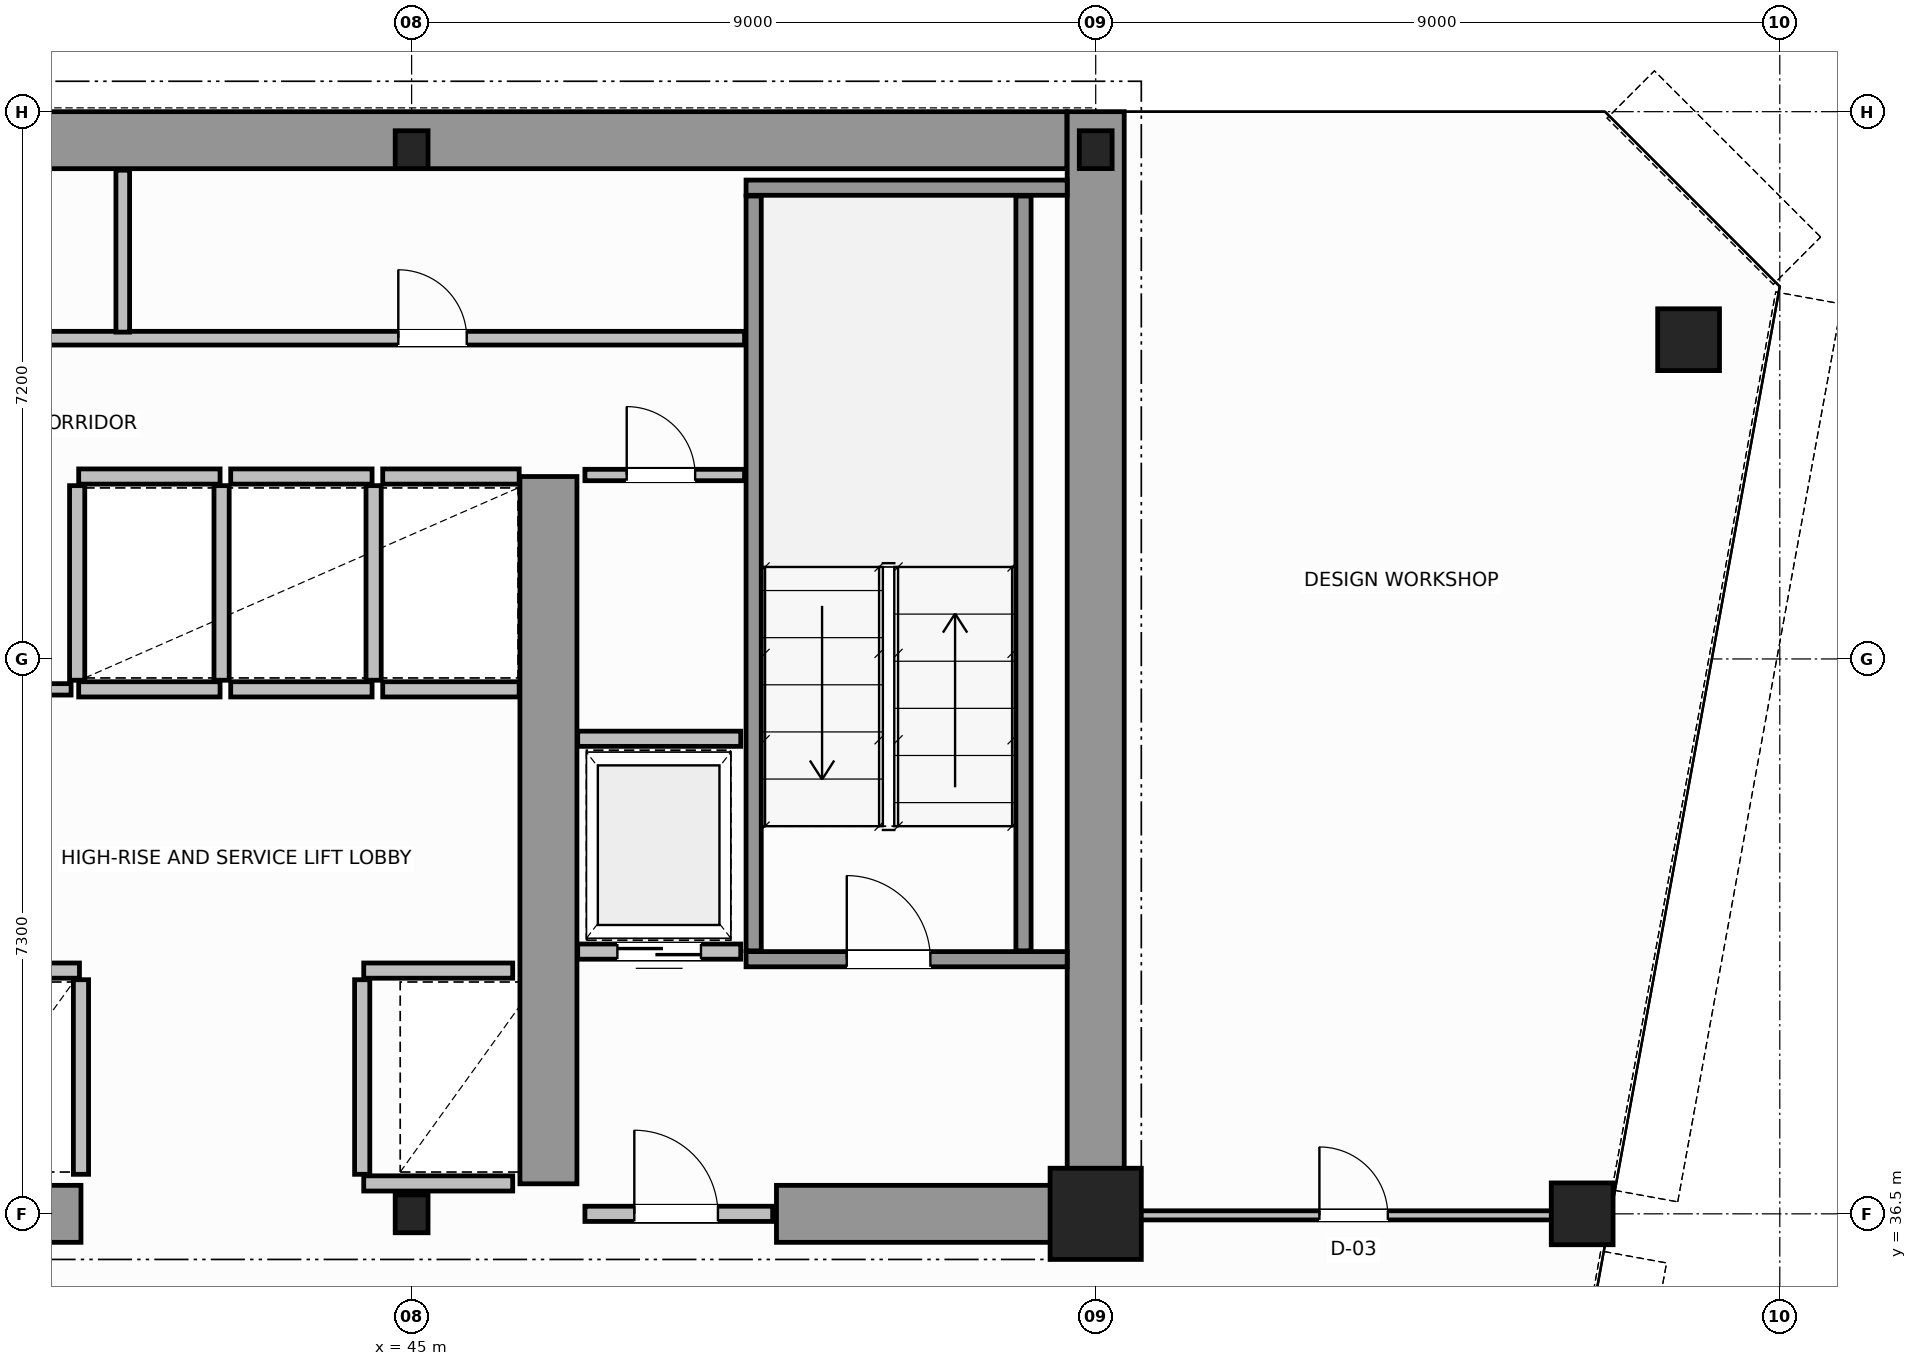
"""IFC4 building model, lengths in metres.
Left out: names, types, materials, properties, quantities, classifications, styles, units other than length and angle.
Written with IfcOpenShell. Run it as: python <this file> out.ifc"""

import sys

from ifc_helpers import new_model, si_unit, direction, frame, frame_2d, origin, origin_2d, place, context, subcontext, project, spatial, rectangle, hollow_circle, i_section, extrude, source, transform, mapped, element, fill, save


model = new_model("IFC4")
c1 = context("Model", 3, precision=1e-05, world=origin(), true_north=direction((0.0, 1.0)))
c2 = subcontext(c1, "Body", "Model", "MODEL_VIEW")
j1 = project(units=[si_unit("LENGTHUNIT", "METRE"), si_unit("PLANEANGLEUNIT", "RADIAN")], contexts=[c1])
p1 = place(None, origin())
s1 = spatial("IfcSite", under=j1, at=p1, CompositionType="ELEMENT")
p2 = place(p1, origin())
s2 = spatial("IfcBuilding", under=s1, at=p2, CompositionType="ELEMENT")
p3 = place(p2, frame((0.0, 0.0, 161.4)))
s3 = spatial("IfcBuildingStorey", under=s2, at=p3, CompositionType="ELEMENT", Elevation=161.4)
m1 = source(origin(), c2, "Body", "SweptSolid", [
    extrude(i_section(OverallWidth=0.432, OverallDepth=0.498, WebThickness=0.055, FlangeThickness=0.068, FilletRadius=0.015, at=origin_2d()), origin(), (0.0, 0.0, 1.0), 3.8),
])
p4 = place(p3, frame((45.0, 36.5, 0.0), z_axis=(0.0, 0.0, 1.0), x_axis=(1.0, 0.0, 0.0)))
e1 = element("IfcColumn", 1, at=p4, inside=s3, PredefinedType="COLUMN", context=c2, shape_type="MappedRepresentation", body=[
    mapped(m1, transform((0.0, 0.0, 0.0), scale=1.0)),
])
m2 = source(origin(), c2, "Body", "SweptSolid", [
    extrude(rectangle(XDim=1.2, YDim=1.2, at=origin_2d()), origin(), (0.0, 0.0, 1.0), 3.8),
])
p5 = place(p3, frame((54.0, 36.5, 0.0), z_axis=(0.0, 0.0, 1.0), x_axis=(1.0, 0.0, 0.0)))
e2 = element("IfcColumn", 2, at=p5, inside=s3, PredefinedType="COLUMN", context=c2, shape_type="MappedRepresentation", body=[
    mapped(m2, transform((0.0, 0.0, 0.0), scale=1.0)),
])
for number, where, z_axis, x_axis in (
    (3, (45.0, 50.5, 0.0), (0.0, 0.0, 1.0), (1.0, 0.0, 0.0)),
    (4, (54.0, 50.5, 0.0), (0.0, 0.0, 1.0), (1.0, 0.0, 0.0)),
):
    element("IfcColumn", number, at=place(p3, frame(where, z_axis=z_axis, x_axis=x_axis)), inside=s3, PredefinedType="COLUMN", context=c2, shape_type="MappedRepresentation", body=[
        mapped(m1, transform((0.0, 0.0, 0.0), scale=1.0)),
    ])
m3 = source(origin(), c2, "Body", "SweptSolid", [
    extrude(hollow_circle(Radius=0.406, WallThickness=0.04, at=origin_2d()), origin(), (0.0, 0.0, 1.0), 3.8),
])
for number, where, z_axis, x_axis in (
    (5, (61.8, 48.0, 0.0), (0.0, 0.0, 1.0), (1.0, 0.0, 0.0)),
    (6, (60.4, 36.5, 0.0), (0.0, 0.0, 1.0), (1.0, 0.0, 0.0)),
):
    element("IfcColumn", number, at=place(p3, frame(where, z_axis=z_axis, x_axis=x_axis)), inside=s3, PredefinedType="COLUMN", context=c2, shape_type="MappedRepresentation", body=[
        mapped(m3, transform((0.0, 0.0, 0.0), scale=1.0)),
    ])
p6 = place(p3, frame((34.002, 50.625, 0.0), z_axis=(0.0, 0.0, 1.0), x_axis=(1.0, 0.0, 0.0)))
e7 = element("IfcWall", 7, at=p6, inside=s3, PredefinedType="SHEAR", context=c2, shape_type="SweptSolid", body=[
    extrude(rectangle(XDim=19.619, YDim=0.75, at=frame_2d((9.81, 0.0))), origin(), (0.0, 0.0, 1.0), 3.8),
])
p7 = place(p3, frame((54.0, 36.5, 0.0), z_axis=(0.0, 0.0, 1.0), x_axis=(0.0, 1.0, 0.0)))
e8 = element("IfcWall", 8, at=p7, inside=s3, PredefinedType="SHEAR", context=c2, shape_type="SweptSolid", body=[
    extrude(rectangle(XDim=14.5, YDim=0.75, at=frame_2d((7.25, 0.0))), origin(), (0.0, 0.0, 1.0), 3.8),
])
p8 = place(p3, frame((36.15, 36.5, 0.0), z_axis=(0.0, 0.0, 1.0), x_axis=(1.0, 0.0, 0.0)))
e9 = element("IfcWall", 9, at=p8, inside=s3, PredefinedType="SHEAR", context=c2, shape_type="SweptSolid", body=[
    extrude(rectangle(XDim=4.5, YDim=0.75, at=frame_2d((2.25, 0.0))), origin(), (0.0, 0.0, 1.0), 3.8),
])
p9 = place(p3, frame((49.8, 36.5, 0.0), z_axis=(0.0, 0.0, 1.0), x_axis=(1.0, 0.0, 0.0)))
e10 = element("IfcWall", 10, at=p9, inside=s3, PredefinedType="SHEAR", context=c2, shape_type="SweptSolid", body=[
    extrude(rectangle(XDim=3.805, YDim=0.75, at=frame_2d((1.902, 0.0))), origin(), (0.0, 0.0, 1.0), 2.38),
])
p10 = place(p3, frame((46.8, 36.895, 0.0), z_axis=(0.0, 0.0, 1.0), x_axis=(0.0, 1.0, 0.0)))
e11 = element("IfcWall", 11, at=p10, inside=s3, PredefinedType="SHEAR", context=c2, shape_type="SweptSolid", body=[
    extrude(rectangle(XDim=9.305, YDim=0.75, at=frame_2d((4.652, 0.0))), origin(), (0.0, 0.0, 1.0), 3.8),
])
p11 = place(p3, frame((49.4, 39.85, 0.0), z_axis=(0.0, 0.0, 1.0), x_axis=(1.0, 0.0, 0.0)))
e12 = element("IfcWall", 12, at=p11, inside=s3, PredefinedType="SOLIDWALL", context=c2, shape_type="SweptSolid", body=[
    extrude(rectangle(XDim=4.225, YDim=0.2, at=frame_2d((2.113, 0.0))), origin(), (0.0, 0.0, 1.0), 3.8),
])
p12 = place(p11, frame((1.325, 0.0, 0.0)))
e13 = element("IfcOpeningElement", 13, at=p12, cuts=e12, PredefinedType="OPENING", context=c2, shape_type="SweptSolid", body=[
    extrude(rectangle(XDim=1.1, YDim=2.15, at=frame_2d((0.55, 1.075))), frame((0.0, 0.11, 0.0), z_axis=(0.0, -1.0, 0.0), x_axis=(1.0, 0.0, 0.0)), (0.0, 0.0, 1.0), 0.22),
])
p13 = place(p3, frame((49.4, 50.0, 0.0), z_axis=(0.0, 0.0, 1.0), x_axis=(1.0, 0.0, 0.0)))
e14 = element("IfcWall", 14, at=p13, inside=s3, PredefinedType="SOLIDWALL", context=c2, shape_type="SweptSolid", body=[
    extrude(rectangle(XDim=4.225, YDim=0.2, at=frame_2d((2.113, 0.0))), origin(), (0.0, 0.0, 1.0), 3.8),
])
for number, where, z_axis, x_axis in (
    (15, (49.5, 39.96, 0.0), (0.0, 0.0, 1.0), (0.0, 1.0, 0.0)),
    (16, (53.05, 39.96, 0.0), (0.0, 0.0, 1.0), (0.0, 1.0, 0.0)),
):
    element("IfcWall", number, at=place(p3, frame(where, z_axis=z_axis, x_axis=x_axis)), inside=s3, PredefinedType="SOLIDWALL", context=c2, shape_type="SweptSolid", body=[
        extrude(rectangle(XDim=9.93, YDim=0.2, at=frame_2d((4.965, 0.0))), origin(), (0.0, 0.0, 1.0), 3.8),
    ])
p14 = place(p3, frame((47.28, 36.5, 0.0), z_axis=(0.0, 0.0, 1.0), x_axis=(1.0, 0.0, 0.0)))
e17 = element("IfcWall", 17, at=p14, inside=s3, PredefinedType="SOLIDWALL", context=c2, shape_type="SweptSolid", body=[
    extrude(rectangle(XDim=2.47, YDim=0.2, at=frame_2d((1.235, 0.0))), origin(), (0.0, 0.0, 1.0), 2.37),
])
p15 = place(p14, frame((0.65, 0.0, 0.0)))
e18 = element("IfcOpeningElement", 18, at=p15, cuts=e17, PredefinedType="OPENING", context=c2, shape_type="SweptSolid", body=[
    extrude(rectangle(XDim=1.1, YDim=2.15, at=frame_2d((0.55, 1.075))), frame((0.0, 0.11, 0.0), z_axis=(0.0, -1.0, 0.0), x_axis=(1.0, 0.0, 0.0)), (0.0, 0.0, 1.0), 0.22),
])
p16 = place(p3, frame((38.785, 39.7, 0.0), z_axis=(0.0, 0.0, 1.0), x_axis=(1.0, 0.0, 0.0)))
e19 = element("IfcWall", 19, at=p16, inside=s3, PredefinedType="SOLIDWALL", context=c2, shape_type="SweptSolid", body=[
    extrude(rectangle(XDim=1.845, YDim=0.2, at=frame_2d((0.922, 0.0))), origin(), (0.0, 0.0, 1.0), 3.58),
])
p17 = place(p3, frame((40.65, 37.02, 0.0), z_axis=(0.0, 0.0, 1.0), x_axis=(0.0, 1.0, 0.0)))
e20 = element("IfcWall", 20, at=p17, inside=s3, PredefinedType="SOLIDWALL", context=c2, shape_type="SweptSolid", body=[
    extrude(rectangle(XDim=2.56, YDim=0.2, at=frame_2d((1.28, 0.0))), origin(), (0.0, 0.0, 1.0), 3.58),
])
p18 = place(p3, frame((44.37, 39.7, 0.0), z_axis=(0.0, 0.0, 1.0), x_axis=(1.0, 0.0, 0.0)))
e21 = element("IfcWall", 21, at=p18, inside=s3, PredefinedType="SOLIDWALL", context=c2, shape_type="SweptSolid", body=[
    extrude(rectangle(XDim=1.96, YDim=0.2, at=frame_2d((0.98, 0.0))), origin(), (0.0, 0.0, 1.0), 3.58),
])
p19 = place(p3, frame((44.37, 36.9, 0.0), z_axis=(0.0, 0.0, 1.0), x_axis=(1.0, 0.0, 0.0)))
e22 = element("IfcWall", 22, at=p19, inside=s3, PredefinedType="SOLIDWALL", context=c2, shape_type="SweptSolid", body=[
    extrude(rectangle(XDim=1.96, YDim=0.2, at=frame_2d((0.98, 0.0))), origin(), (0.0, 0.0, 1.0), 2.37),
])
p20 = place(p3, frame((44.35, 37.02, 0.0), z_axis=(0.0, 0.0, 1.0), x_axis=(0.0, 1.0, 0.0)))
e23 = element("IfcWall", 23, at=p20, inside=s3, PredefinedType="SOLIDWALL", context=c2, shape_type="SweptSolid", body=[
    extrude(rectangle(XDim=2.56, YDim=0.2, at=frame_2d((1.28, 0.0))), origin(), (0.0, 0.0, 1.0), 3.58),
])
for number, where, z_axis, x_axis in (
    (24, (40.62, 43.4, 0.0), (0.0, 0.0, 1.0), (1.0, 0.0, 0.0)),
    (25, (40.62, 46.2, 0.0), (0.0, 0.0, 1.0), (1.0, 0.0, 0.0)),
):
    element("IfcWall", number, at=place(p3, frame(where, z_axis=z_axis, x_axis=x_axis)), inside=s3, PredefinedType="SOLIDWALL", context=c2, shape_type="SweptSolid", body=[
        extrude(rectangle(XDim=1.86, YDim=0.2, at=frame_2d((0.93, 0.0))), origin(), (0.0, 0.0, 1.0), 3.58),
    ])
for number, where, z_axis, x_axis in (
    (26, (40.6, 43.52, 0.0), (0.0, 0.0, 1.0), (0.0, 1.0, 0.0)),
    (27, (42.5, 43.52, 0.0), (0.0, 0.0, 1.0), (0.0, 1.0, 0.0)),
):
    element("IfcWall", number, at=place(p3, frame(where, z_axis=z_axis, x_axis=x_axis)), inside=s3, PredefinedType="SOLIDWALL", context=c2, shape_type="SweptSolid", body=[
        extrude(rectangle(XDim=2.56, YDim=0.2, at=frame_2d((1.28, 0.0))), origin(), (0.0, 0.0, 1.0), 3.58),
    ])
for number, where, z_axis, x_axis in (
    (28, (42.62, 43.4, 0.0), (0.0, 0.0, 1.0), (1.0, 0.0, 0.0)),
    (29, (42.62, 46.2, 0.0), (0.0, 0.0, 1.0), (1.0, 0.0, 0.0)),
):
    element("IfcWall", number, at=place(p3, frame(where, z_axis=z_axis, x_axis=x_axis)), inside=s3, PredefinedType="SOLIDWALL", context=c2, shape_type="SweptSolid", body=[
        extrude(rectangle(XDim=1.86, YDim=0.2, at=frame_2d((0.93, 0.0))), origin(), (0.0, 0.0, 1.0), 3.58),
    ])
p21 = place(p3, frame((44.5, 43.52, 0.0), z_axis=(0.0, 0.0, 1.0), x_axis=(0.0, 1.0, 0.0)))
e30 = element("IfcWall", 30, at=p21, inside=s3, PredefinedType="SOLIDWALL", context=c2, shape_type="SweptSolid", body=[
    extrude(rectangle(XDim=2.56, YDim=0.2, at=frame_2d((1.28, 0.0))), origin(), (0.0, 0.0, 1.0), 3.58),
])
for number, where, z_axis, x_axis in (
    (31, (44.62, 43.4, 0.0), (0.0, 0.0, 1.0), (1.0, 0.0, 0.0)),
    (32, (44.62, 46.2, 0.0), (0.0, 0.0, 1.0), (1.0, 0.0, 0.0)),
):
    element("IfcWall", number, at=place(p3, frame(where, z_axis=z_axis, x_axis=x_axis)), inside=s3, PredefinedType="SOLIDWALL", context=c2, shape_type="SweptSolid", body=[
        extrude(rectangle(XDim=1.795, YDim=0.2, at=frame_2d((0.897, 0.0))), origin(), (0.0, 0.0, 1.0), 3.58),
    ])
p22 = place(p3, frame((47.185, 39.95, 0.0), z_axis=(0.0, 0.0, 1.0), x_axis=(1.0, 0.0, 0.0)))
e33 = element("IfcWall", 33, at=p22, inside=s3, PredefinedType="SOLIDWALL", context=c2, shape_type="SweptSolid", body=[
    extrude(rectangle(XDim=2.145, YDim=0.2, at=frame_2d((1.073, 0.0))), origin(), (0.0, 0.0, 1.0), 3.58),
])
p23 = place(p22, frame((0.522, 0.0, 0.0)))
e34 = element("IfcOpeningElement", 34, at=p23, cuts=e33, PredefinedType="OPENING", context=c2, shape_type="SweptSolid", body=[
    extrude(rectangle(XDim=1.1, YDim=2.15, at=frame_2d((0.55, 1.075))), frame((0.0, 0.11, 0.0), z_axis=(0.0, -1.0, 0.0), x_axis=(1.0, 0.0, 0.0)), (0.0, 0.0, 1.0), 0.22),
])
p24 = place(p3, frame((47.185, 42.75, 0.0), z_axis=(0.0, 0.0, 1.0), x_axis=(1.0, 0.0, 0.0)))
e35 = element("IfcWall", 35, at=p24, inside=s3, PredefinedType="SOLIDWALL", context=c2, shape_type="SweptSolid", body=[
    extrude(rectangle(XDim=2.145, YDim=0.2, at=frame_2d((1.073, 0.0))), origin(), (0.0, 0.0, 1.0), 3.58),
])
p25 = place(p3, frame((47.28, 46.22, 0.0), z_axis=(0.0, 0.0, 1.0), x_axis=(1.0, 0.0, 0.0)))
e36 = element("IfcWall", 36, at=p25, inside=s3, PredefinedType="PARTITIONING", context=c2, shape_type="SweptSolid", body=[
    extrude(rectangle(XDim=2.1, YDim=0.15, at=frame_2d((1.05, 0.0))), origin(), (0.0, 0.0, 1.0), 3.58),
])
p26 = place(p25, frame((0.55, 0.0, 0.0)))
e37 = element("IfcOpeningElement", 37, at=p26, cuts=e36, PredefinedType="OPENING", context=c2, shape_type="SweptSolid", body=[
    extrude(rectangle(XDim=0.9, YDim=2.1, at=frame_2d((0.45, 1.05))), frame((0.0, 0.085, 0.0), z_axis=(0.0, -1.0, 0.0), x_axis=(1.0, 0.0, 0.0)), (0.0, 0.0, 1.0), 0.17),
])
p27 = place(p3, frame((38.92, 43.4, 0.0), z_axis=(0.0, 0.0, 1.0), x_axis=(1.0, 0.0, 0.0)))
e38 = element("IfcWall", 38, at=p27, inside=s3, PredefinedType="PARTITIONING", context=c2, shape_type="SweptSolid", body=[
    extrude(rectangle(XDim=1.6, YDim=0.15, at=frame_2d((0.8, 0.0))), origin(), (0.0, 0.0, 1.0), 3.58),
])
p28 = place(p27, frame((0.35, 0.0, 0.0)))
e39 = element("IfcOpeningElement", 39, at=p28, cuts=e38, PredefinedType="OPENING", context=c2, shape_type="SweptSolid", body=[
    extrude(rectangle(XDim=0.9, YDim=2.1, at=frame_2d((0.45, 1.05))), frame((0.0, 0.085, 0.0), z_axis=(0.0, -1.0, 0.0), x_axis=(1.0, 0.0, 0.0)), (0.0, 0.0, 1.0), 0.17),
])
p29 = place(p3, frame((18.62, 48.02, 0.0), z_axis=(0.0, 0.0, 1.0), x_axis=(1.0, 0.0, 0.0)))
e40 = element("IfcWall", 40, at=p29, inside=s3, PredefinedType="PLUMBINGWALL", context=c2, shape_type="SweptSolid", body=[
    extrude(rectangle(XDim=30.76, YDim=0.18, at=frame_2d((15.38, 0.0))), origin(), (0.0, 0.0, 1.0), 3.58),
])
p30 = place(p29, frame((1.955, 0.0, 0.0)))
e41 = element("IfcOpeningElement", 41, at=p30, cuts=e40, PredefinedType="OPENING", context=c2, shape_type="SweptSolid", body=[
    extrude(rectangle(XDim=0.9, YDim=2.15, at=frame_2d((0.45, 1.075))), frame((0.0, 0.1, 0.0), z_axis=(0.0, -1.0, 0.0), x_axis=(1.0, 0.0, 0.0)), (0.0, 0.0, 1.0), 0.2),
])
p31 = place(p29, frame((8.03, 0.0, 0.0)))
e42 = element("IfcOpeningElement", 42, at=p31, cuts=e40, PredefinedType="OPENING", context=c2, shape_type="SweptSolid", body=[
    extrude(rectangle(XDim=0.9, YDim=2.15, at=frame_2d((0.45, 1.075))), frame((0.0, 0.1, 0.0), z_axis=(0.0, -1.0, 0.0), x_axis=(1.0, 0.0, 0.0)), (0.0, 0.0, 1.0), 0.2),
])
p32 = place(p29, frame((16.93, 0.0, 0.0)))
e43 = element("IfcOpeningElement", 43, at=p32, cuts=e40, PredefinedType="OPENING", context=c2, shape_type="SweptSolid", body=[
    extrude(rectangle(XDim=0.9, YDim=2.15, at=frame_2d((0.45, 1.075))), frame((0.0, 0.1, 0.0), z_axis=(0.0, -1.0, 0.0), x_axis=(1.0, 0.0, 0.0)), (0.0, 0.0, 1.0), 0.2),
])
p33 = place(p29, frame((26.205, 0.0, 0.0)))
e44 = element("IfcOpeningElement", 44, at=p33, cuts=e40, PredefinedType="OPENING", context=c2, shape_type="SweptSolid", body=[
    extrude(rectangle(XDim=0.9, YDim=2.15, at=frame_2d((0.45, 1.075))), frame((0.0, 0.1, 0.0), z_axis=(0.0, -1.0, 0.0), x_axis=(1.0, 0.0, 0.0)), (0.0, 0.0, 1.0), 0.2),
])
p34 = place(p3, frame((41.2, 48.1, 0.0), z_axis=(0.0, 0.0, 1.0), x_axis=(0.0, 1.0, 0.0)))
e45 = element("IfcWall", 45, at=p34, inside=s3, PredefinedType="PLUMBINGWALL", context=c2, shape_type="SweptSolid", body=[
    extrude(rectangle(XDim=2.13, YDim=0.18, at=frame_2d((1.065, 0.0))), origin(), (0.0, 0.0, 1.0), 3.58),
])
p35 = place(p3, frame((54.06, 36.48, 0.0), z_axis=(0.0, 0.0, 1.0), x_axis=(1.0, 0.0, 0.0)))
e46 = element("IfcWall", 46, at=p35, inside=s3, PredefinedType="PARTITIONING", context=c2, shape_type="SweptSolid", body=[
    extrude(rectangle(XDim=6.666, YDim=0.12, at=frame_2d((3.333, 0.0))), origin(), (0.0, 0.0, 1.0), 2.97),
])
p36 = place(p35, frame((2.883, 0.0, 0.0)))
e47 = element("IfcOpeningElement", 47, at=p36, cuts=e46, PredefinedType="OPENING", context=c2, shape_type="SweptSolid", body=[
    extrude(rectangle(XDim=0.9, YDim=2.15, at=frame_2d((0.45, 1.075))), frame((0.0, 0.07, 0.0), z_axis=(0.0, -1.0, 0.0), x_axis=(1.0, 0.0, 0.0)), (0.0, 0.0, 1.0), 0.14),
])
m4 = source(origin(), c2, "Body", "SweptSolid", [
    extrude(rectangle(XDim=1.1, YDim=2.15, at=frame_2d((0.55, 1.075))), frame((0.0, 0.025, 0.0), z_axis=(0.0, -1.0, 0.0), x_axis=(1.0, 0.0, 0.0)), (0.0, 0.0, 1.0), 0.05),
])
p37 = place(p12, origin())
e48 = element("IfcDoor", 48, at=p37, inside=s3, OperationType="SINGLE_SWING_RIGHT", PredefinedType="DOOR", context=c2, shape_type="MappedRepresentation", body=[
    mapped(m4, transform((0.0, 0.0, 0.0), scale=1.0)),
])
fill(e13, e48)
p38 = place(p15, origin())
e49 = element("IfcDoor", 49, at=p38, inside=s3, OperationType="SINGLE_SWING_LEFT", PredefinedType="DOOR", context=c2, shape_type="MappedRepresentation", body=[
    mapped(m4, transform((0.0, 0.0, 0.0), scale=1.0)),
])
fill(e18, e49)
p39 = place(p23, origin())
e50 = element("IfcDoor", 50, at=p39, inside=s3, OperationType="DOUBLE_DOOR_SLIDING", PredefinedType="DOOR", context=c2, shape_type="MappedRepresentation", body=[
    mapped(m4, transform((0.0, 0.0, 0.0), scale=1.0)),
])
fill(e34, e50)
m5 = source(origin(), c2, "Body", "SweptSolid", [
    extrude(rectangle(XDim=0.9, YDim=2.1, at=frame_2d((0.45, 1.05))), frame((0.0, 0.025, 0.0), z_axis=(0.0, -1.0, 0.0), x_axis=(1.0, 0.0, 0.0)), (0.0, 0.0, 1.0), 0.05),
])
p40 = place(p26, origin())
e51 = element("IfcDoor", 51, at=p40, inside=s3, OperationType="SINGLE_SWING_RIGHT", PredefinedType="DOOR", context=c2, shape_type="MappedRepresentation", body=[
    mapped(m5, transform((0.0, 0.0, 0.0), scale=1.0)),
])
fill(e37, e51)
m6 = source(origin(), c2, "Body", "SweptSolid", [
    extrude(rectangle(XDim=0.9, YDim=2.15, at=frame_2d((0.45, 1.075))), frame((0.0, 0.025, 0.0), z_axis=(0.0, -1.0, 0.0), x_axis=(1.0, 0.0, 0.0)), (0.0, 0.0, 1.0), 0.05),
])
p41 = place(p33, origin())
e52 = element("IfcDoor", 52, at=p41, inside=s3, OperationType="SINGLE_SWING_RIGHT", PredefinedType="DOOR", context=c2, shape_type="MappedRepresentation", body=[
    mapped(m6, transform((0.0, 0.0, 0.0), scale=1.0)),
])
fill(e44, e52)
p42 = place(p36, origin())
e53 = element("IfcDoor", 53, at=p42, inside=s3, OperationType="SINGLE_SWING_RIGHT", PredefinedType="DOOR", context=c2, shape_type="MappedRepresentation", body=[
    mapped(m6, transform((0.0, 0.0, 0.0), scale=1.0)),
])
fill(e47, e53)
save(model, sys.argv[1])
